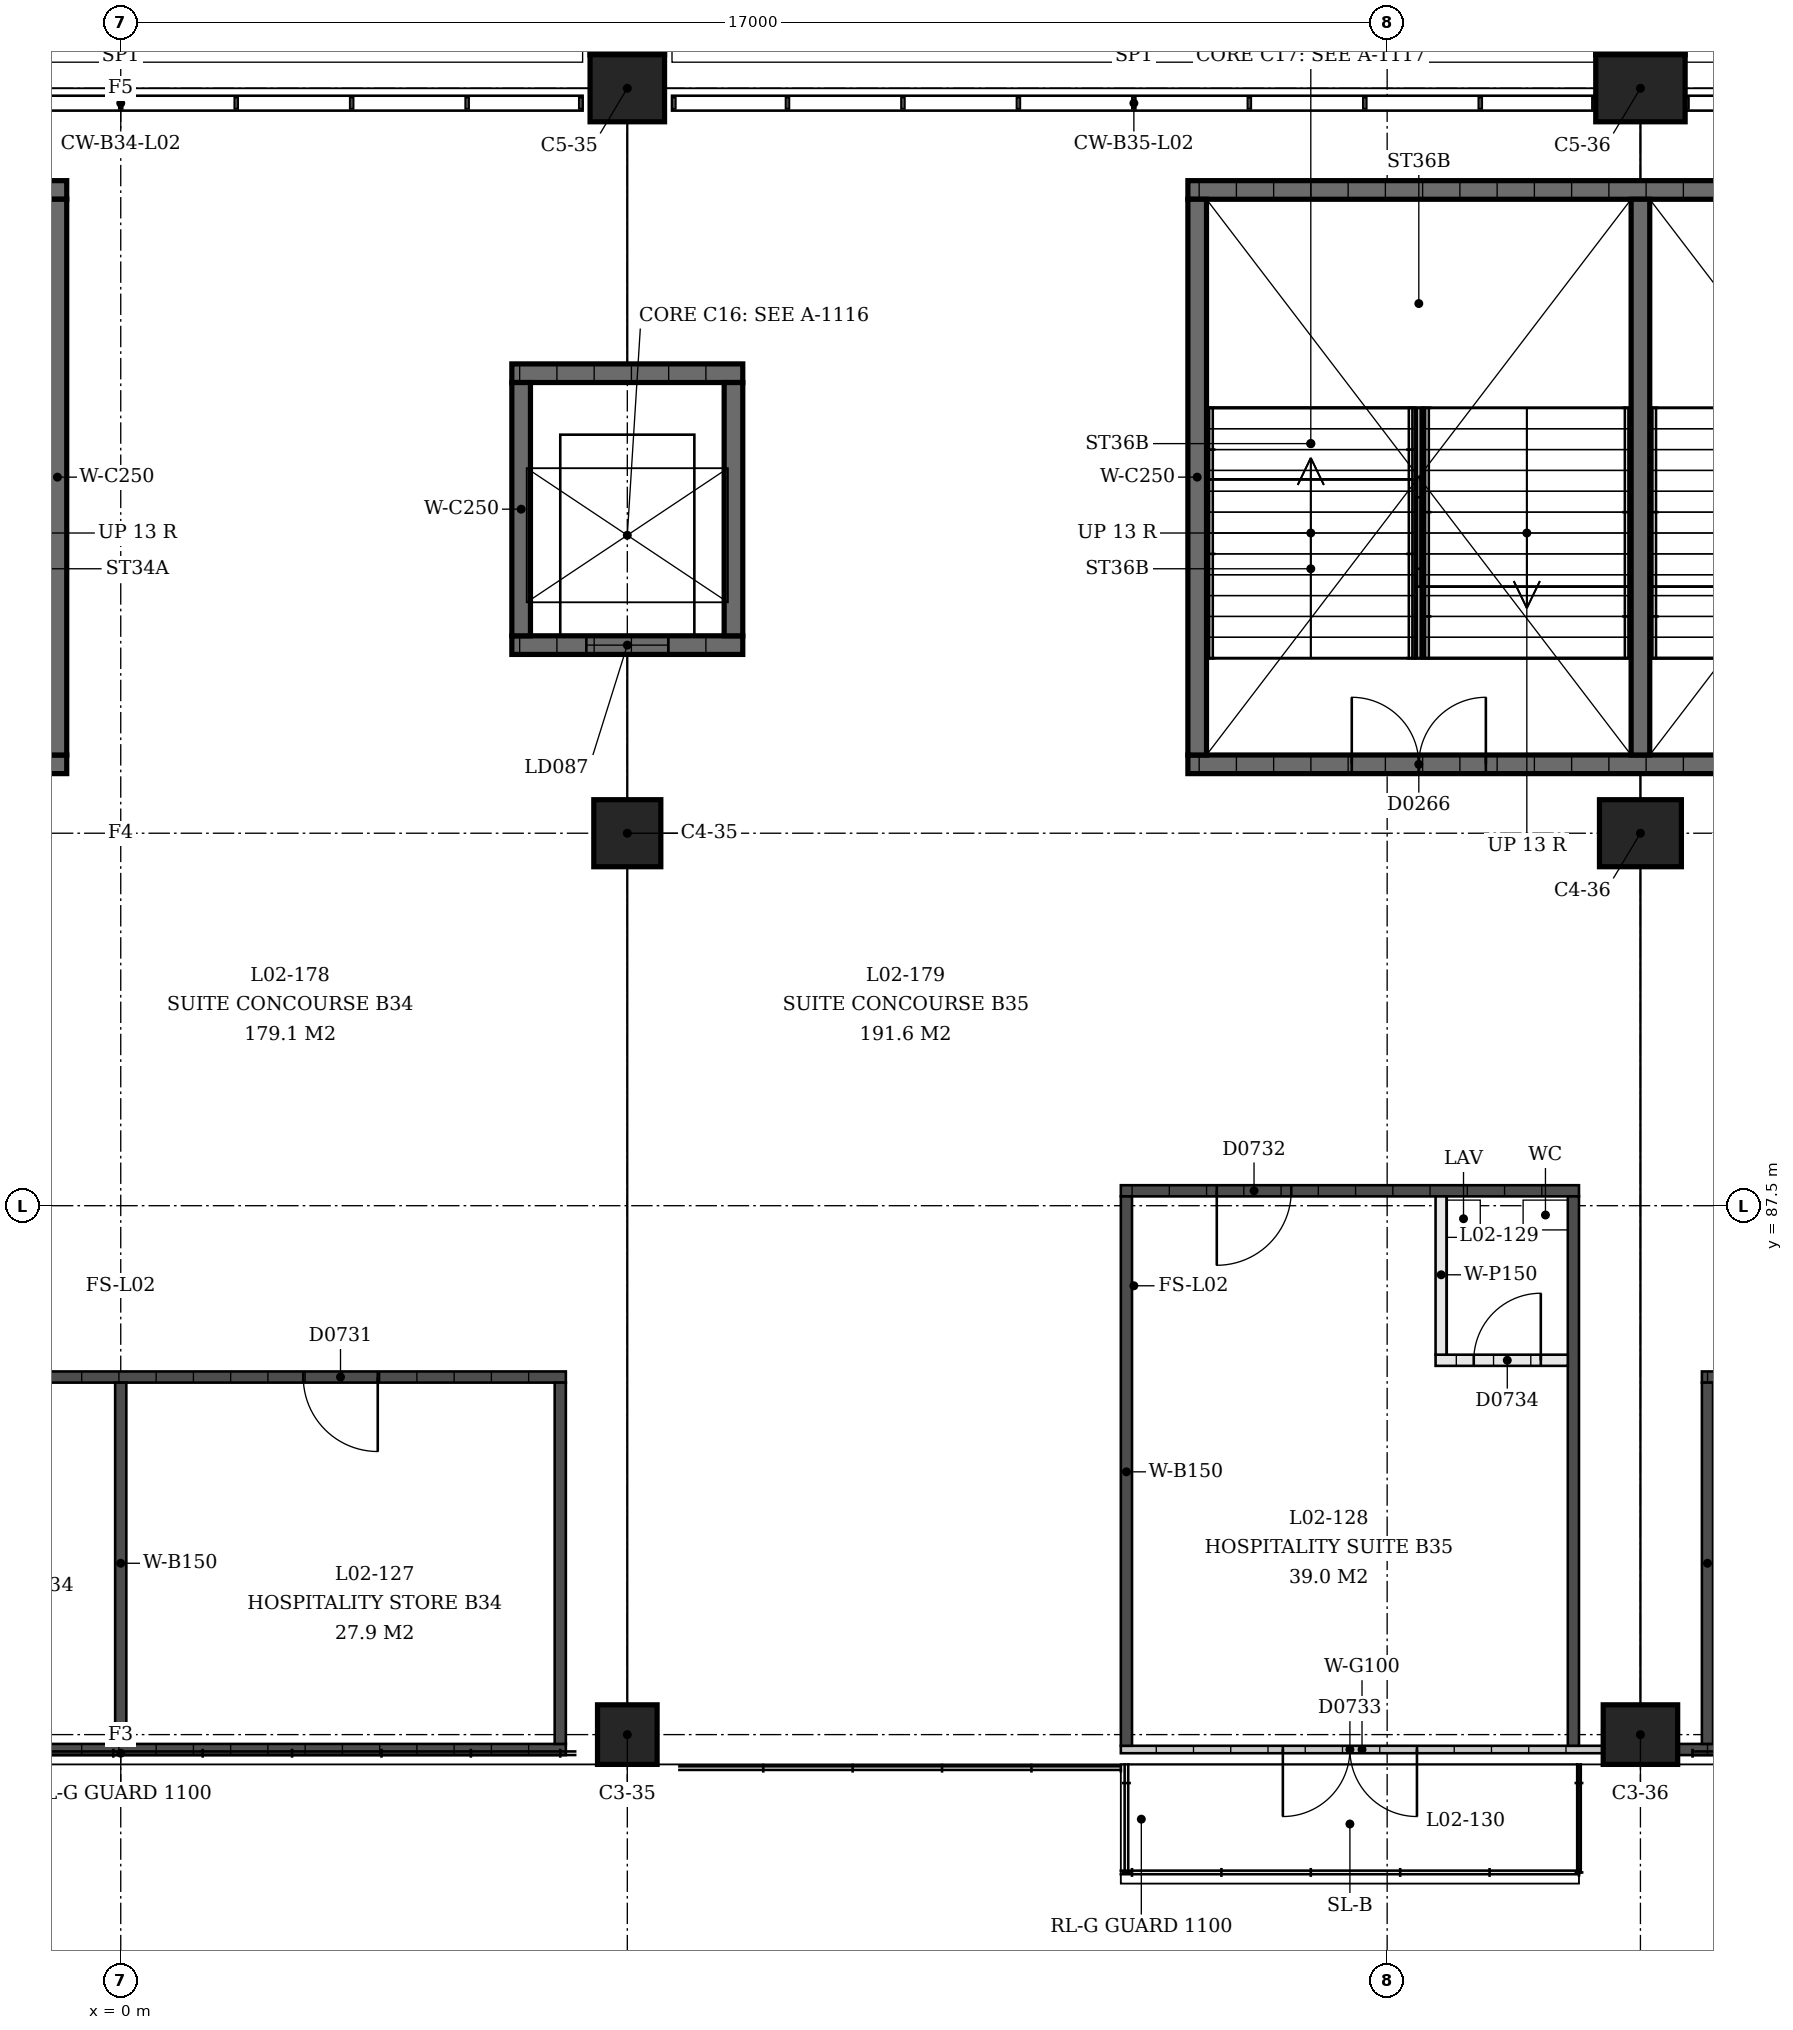
"""IFC4 building model, lengths in metres.
Left out: names, types, materials, properties, quantities, classifications, styles, units other than length and angle.
Written with IfcOpenShell. Run it as: python <this file> out.ifc"""

import sys

from ifc_helpers import new_model, si_unit, direction, frame, frame_2d, origin, origin_2d, place, context, subcontext, project, spatial, rectangle, extrude, element, fill, save


model = new_model("IFC4")
c1 = context("Model", 3, precision=1e-05, world=origin(), true_north=direction((0.0, 1.0)))
c2 = subcontext(c1, "Body", "Model", "MODEL_VIEW")
j1 = project(units=[si_unit("LENGTHUNIT", "METRE"), si_unit("PLANEANGLEUNIT", "RADIAN")], contexts=[c1])
p1 = place(None, origin())
s1 = spatial("IfcSite", under=j1, at=p1, CompositionType="ELEMENT")
p2 = place(p1, origin())
s2 = spatial("IfcBuilding", under=s1, at=p2, CompositionType="ELEMENT")
p3 = place(p2, frame((0.0, 0.0, 9.0)))
s3 = spatial("IfcBuildingStorey", under=s2, at=p3, CompositionType="ELEMENT", Elevation=9.0)
p4 = place(p3, frame((6.8, 80.4, 0.0), z_axis=(0.0, 0.0, 1.0), x_axis=(-1.0, 0.0, 0.0)))
e1 = element("IfcColumn", 1, at=p4, inside=s3, PredefinedType="COLUMN", context=c2, shape_type="SweptSolid", body=[
    extrude(rectangle(XDim=0.8, YDim=0.8, at=origin_2d()), origin(), (0.0, 0.0, 1.0), 4.5),
])
p5 = place(p3, frame((6.8, 92.5, 0.0), z_axis=(0.0, 0.0, 1.0), x_axis=(-1.0, 0.0, 0.0)))
e2 = element("IfcColumn", 2, at=p5, inside=s3, PredefinedType="COLUMN", context=c2, shape_type="SweptSolid", body=[
    extrude(rectangle(XDim=0.9, YDim=0.9, at=origin_2d()), origin(), (0.0, 0.0, 1.0), 4.5),
])
p6 = place(p3, frame((6.8, 102.5, 0.0), z_axis=(0.0, 0.0, 1.0), x_axis=(-1.0, 0.0, 0.0)))
e3 = element("IfcColumn", 3, at=p6, inside=s3, PredefinedType="COLUMN", context=c2, shape_type="SweptSolid", body=[
    extrude(rectangle(XDim=1.0, YDim=0.9, at=origin_2d()), origin(), (0.0, 0.0, 1.0), 4.5),
])
p7 = place(p3, frame((20.4, 80.4, 0.0), z_axis=(0.0, 0.0, 1.0), x_axis=(-1.0, 0.0, 0.0)))
e4 = element("IfcColumn", 4, at=p7, inside=s3, PredefinedType="COLUMN", context=c2, shape_type="SweptSolid", body=[
    extrude(rectangle(XDim=1.0, YDim=0.8, at=origin_2d()), origin(), (0.0, 0.0, 1.0), 4.5),
])
p8 = place(p3, frame((20.4, 92.5, 0.0), z_axis=(0.0, 0.0, 1.0), x_axis=(-1.0, 0.0, 0.0)))
e5 = element("IfcColumn", 5, at=p8, inside=s3, PredefinedType="COLUMN", context=c2, shape_type="SweptSolid", body=[
    extrude(rectangle(XDim=1.1, YDim=0.9, at=origin_2d()), origin(), (0.0, 0.0, 1.0), 4.5),
])
p9 = place(p3, frame((20.4, 102.5, 0.0), z_axis=(0.0, 0.0, 1.0), x_axis=(-1.0, 0.0, 0.0)))
e6 = element("IfcColumn", 6, at=p9, inside=s3, PredefinedType="COLUMN", context=c2, shape_type="SweptSolid", body=[
    extrude(rectangle(XDim=1.2, YDim=0.9, at=origin_2d()), origin(), (0.0, 0.0, 1.0), 4.5),
])
p10 = place(p3, frame((-0.725, 93.425, 0.0), z_axis=(0.0, 0.0, 1.0), x_axis=(-1.0, 0.0, 0.0)))
e7 = element("IfcWall", 7, at=p10, inside=s3, PredefinedType="SHEAR", context=c2, shape_type="SweptSolid", body=[
    extrude(rectangle(XDim=12.15, YDim=0.25, at=frame_2d((6.075, 0.0))), origin(), (0.0, 0.0, 1.0), 4.09),
])
p11 = place(p10, frame((2.2, 0.0, 0.0)))
e8 = element("IfcOpeningElement", 8, at=p11, cuts=e7, PredefinedType="OPENING", context=c2, shape_type="SweptSolid", body=[
    extrude(rectangle(XDim=1.8, YDim=2.1, at=frame_2d((0.9, 1.05))), frame((0.0, 0.125, 0.0), z_axis=(0.0, -1.0, 0.0), x_axis=(1.0, 0.0, 0.0)), (0.0, 0.0, 1.0), 0.25),
])
p12 = place(p10, frame((8.15, 0.0, 0.0)))
e9 = element("IfcOpeningElement", 9, at=p12, cuts=e7, PredefinedType="OPENING", context=c2, shape_type="SweptSolid", body=[
    extrude(rectangle(XDim=1.8, YDim=2.1, at=frame_2d((0.9, 1.05))), frame((0.0, 0.125, 0.0), z_axis=(0.0, -1.0, 0.0), x_axis=(1.0, 0.0, 0.0)), (0.0, 0.0, 1.0), 0.25),
])
p13 = place(p3, frame((-0.725, 101.135, 0.0), z_axis=(0.0, 0.0, 1.0), x_axis=(-1.0, 0.0, 0.0)))
e10 = element("IfcWall", 10, at=p13, inside=s3, PredefinedType="SHEAR", context=c2, shape_type="SweptSolid", body=[
    extrude(rectangle(XDim=12.15, YDim=0.25, at=frame_2d((6.075, 0.0))), origin(), (0.0, 0.0, 1.0), 4.09),
])
p14 = place(p3, frame((-0.85, 93.55, 0.0), z_axis=(0.0, 0.0, 1.0), x_axis=(0.0, 1.0, 0.0)))
e11 = element("IfcWall", 11, at=p14, inside=s3, PredefinedType="SHEAR", context=c2, shape_type="SweptSolid", body=[
    extrude(rectangle(XDim=7.46, YDim=0.25, at=frame_2d((3.73, 0.0))), origin(), (0.0, 0.0, 1.0), 4.09),
])
p15 = place(p3, frame((26.475, 93.425, 0.0), z_axis=(0.0, 0.0, 1.0), x_axis=(-1.0, 0.0, 0.0)))
e12 = element("IfcWall", 12, at=p15, inside=s3, PredefinedType="SHEAR", context=c2, shape_type="SweptSolid", body=[
    extrude(rectangle(XDim=12.15, YDim=0.25, at=frame_2d((6.075, 0.0))), origin(), (0.0, 0.0, 1.0), 4.09),
])
p16 = place(p15, frame((2.2, 0.0, 0.0)))
e13 = element("IfcOpeningElement", 13, at=p16, cuts=e12, PredefinedType="OPENING", context=c2, shape_type="SweptSolid", body=[
    extrude(rectangle(XDim=1.8, YDim=2.1, at=frame_2d((0.9, 1.05))), frame((0.0, 0.125, 0.0), z_axis=(0.0, -1.0, 0.0), x_axis=(1.0, 0.0, 0.0)), (0.0, 0.0, 1.0), 0.25),
])
p17 = place(p15, frame((8.15, 0.0, 0.0)))
e14 = element("IfcOpeningElement", 14, at=p17, cuts=e12, PredefinedType="OPENING", context=c2, shape_type="SweptSolid", body=[
    extrude(rectangle(XDim=1.8, YDim=2.1, at=frame_2d((0.9, 1.05))), frame((0.0, 0.125, 0.0), z_axis=(0.0, -1.0, 0.0), x_axis=(1.0, 0.0, 0.0)), (0.0, 0.0, 1.0), 0.25),
])
p18 = place(p3, frame((26.475, 101.135, 0.0), z_axis=(0.0, 0.0, 1.0), x_axis=(-1.0, 0.0, 0.0)))
e15 = element("IfcWall", 15, at=p18, inside=s3, PredefinedType="SHEAR", context=c2, shape_type="SweptSolid", body=[
    extrude(rectangle(XDim=12.15, YDim=0.25, at=frame_2d((6.075, 0.0))), origin(), (0.0, 0.0, 1.0), 4.09),
])
for number, where, z_axis, x_axis in (
    (16, (14.45, 93.55, 0.0), (0.0, 0.0, 1.0), (0.0, 1.0, 0.0)),
    (17, (20.4, 93.55, 0.0), (0.0, 0.0, 1.0), (0.0, 1.0, 0.0)),
):
    element("IfcWall", number, at=place(p3, frame(where, z_axis=z_axis, x_axis=x_axis)), inside=s3, PredefinedType="SHEAR", context=c2, shape_type="SweptSolid", body=[
        extrude(rectangle(XDim=7.46, YDim=0.25, at=frame_2d((3.73, 0.0))), origin(), (0.0, 0.0, 1.0), 4.09),
    ])
p19 = place(p3, frame((8.35, 95.025, 0.0), z_axis=(0.0, 0.0, 1.0), x_axis=(-1.0, 0.0, 0.0)))
e18 = element("IfcWall", 18, at=p19, inside=s3, PredefinedType="SHEAR", context=c2, shape_type="SweptSolid", body=[
    extrude(rectangle(XDim=3.1, YDim=0.25, at=frame_2d((1.55, 0.0))), origin(), (0.0, 0.0, 1.0), 4.09),
])
p20 = place(p19, frame((1.0, 0.0, 0.0)))
e19 = element("IfcOpeningElement", 19, at=p20, cuts=e18, PredefinedType="OPENING", context=c2, shape_type="SweptSolid", body=[
    extrude(rectangle(XDim=1.1, YDim=2.1, at=frame_2d((0.55, 1.05))), frame((0.0, 0.125, 0.0), z_axis=(0.0, -1.0, 0.0), x_axis=(1.0, 0.0, 0.0)), (0.0, 0.0, 1.0), 0.25),
])
p21 = place(p3, frame((8.35, 98.675, 0.0), z_axis=(0.0, 0.0, 1.0), x_axis=(-1.0, 0.0, 0.0)))
e20 = element("IfcWall", 20, at=p21, inside=s3, PredefinedType="SHEAR", context=c2, shape_type="SweptSolid", body=[
    extrude(rectangle(XDim=3.1, YDim=0.25, at=frame_2d((1.55, 0.0))), origin(), (0.0, 0.0, 1.0), 4.09),
])
for number, where, z_axis, x_axis in (
    (21, (8.225, 95.15, 0.0), (0.0, 0.0, 1.0), (0.0, 1.0, 0.0)),
    (22, (5.375, 95.15, 0.0), (0.0, 0.0, 1.0), (0.0, 1.0, 0.0)),
):
    element("IfcWall", number, at=place(p3, frame(where, z_axis=z_axis, x_axis=x_axis)), inside=s3, PredefinedType="SHEAR", context=c2, shape_type="SweptSolid", body=[
        extrude(rectangle(XDim=3.4, YDim=0.25, at=frame_2d((1.7, 0.0))), origin(), (0.0, 0.0, 1.0), 4.09),
    ])
p22 = place(p3, frame((-6.3, 80.2, 0.0), z_axis=(0.0, 0.0, 1.0), x_axis=(1.0, 0.0, 0.0)))
e23 = element("IfcWall", 23, at=p22, inside=s3, PredefinedType="SOLIDWALL", context=c2, shape_type="SweptSolid", body=[
    extrude(rectangle(XDim=12.275, YDim=0.15, at=frame_2d((6.138, 0.0))), origin(), (0.0, 0.0, 1.0), 3.0),
])
p23 = place(p3, frame((-5.975, 85.2, 0.0), z_axis=(0.0, 0.0, 1.0), x_axis=(1.0, 0.0, 0.0)))
e24 = element("IfcWall", 24, at=p23, inside=s3, PredefinedType="SOLIDWALL", context=c2, shape_type="SweptSolid", body=[
    extrude(rectangle(XDim=11.95, YDim=0.15, at=frame_2d((5.975, 0.0))), origin(), (0.0, 0.0, 1.0), 3.0),
])
p24 = place(p23, frame((2.525, 0.0, 0.0)))
e25 = element("IfcOpeningElement", 25, at=p24, cuts=e24, PredefinedType="OPENING", context=c2, shape_type="SweptSolid", body=[
    extrude(rectangle(XDim=1.0, YDim=2.1, at=frame_2d((0.5, 1.05))), frame((0.0, 0.075, 0.0), z_axis=(0.0, -1.0, 0.0), x_axis=(1.0, 0.0, 0.0)), (0.0, 0.0, 1.0), 0.15),
])
p25 = place(p23, frame((8.425, 0.0, 0.0)))
e26 = element("IfcOpeningElement", 26, at=p25, cuts=e24, PredefinedType="OPENING", context=c2, shape_type="SweptSolid", body=[
    extrude(rectangle(XDim=1.0, YDim=2.1, at=frame_2d((0.5, 1.05))), frame((0.0, 0.075, 0.0), z_axis=(0.0, -1.0, 0.0), x_axis=(1.0, 0.0, 0.0)), (0.0, 0.0, 1.0), 0.15),
])
for number, where, z_axis, x_axis in (
    (27, (0.0, 80.275, 0.0), (0.0, 0.0, 1.0), (0.0, 1.0, 0.0)),
    (28, (5.9, 80.275, 0.0), (0.0, 0.0, 1.0), (0.0, 1.0, 0.0)),
):
    element("IfcWall", number, at=place(p3, frame(where, z_axis=z_axis, x_axis=x_axis)), inside=s3, PredefinedType="SOLIDWALL", context=c2, shape_type="SweptSolid", body=[
        extrude(rectangle(XDim=4.85, YDim=0.15, at=frame_2d((2.425, 0.0))), origin(), (0.0, 0.0, 1.0), 3.0),
    ])
p26 = place(p3, frame((19.9, 80.2, 0.0), z_axis=(0.0, 0.0, 1.0), x_axis=(-1.0, 0.0, 0.0)))
e29 = element("IfcWall", 29, at=p26, inside=s3, PredefinedType="PARTITIONING", context=c2, shape_type="SweptSolid", body=[
    extrude(rectangle(XDim=6.475, YDim=0.1, at=frame_2d((3.237, 0.0))), origin(), (0.0, 0.0, 1.0), 3.0),
])
p27 = place(p26, frame((2.5, 0.0, 0.0)))
e30 = element("IfcOpeningElement", 30, at=p27, cuts=e29, PredefinedType="OPENING", context=c2, shape_type="SweptSolid", body=[
    extrude(rectangle(XDim=1.8, YDim=2.1, at=frame_2d((0.9, 1.05))), frame((0.0, 0.05, 0.0), z_axis=(0.0, -1.0, 0.0), x_axis=(1.0, 0.0, 0.0)), (0.0, 0.0, 1.0), 0.1),
])
p28 = place(p3, frame((19.575, 87.7, 0.0), z_axis=(0.0, 0.0, 1.0), x_axis=(-1.0, 0.0, 0.0)))
e31 = element("IfcWall", 31, at=p28, inside=s3, PredefinedType="SOLIDWALL", context=c2, shape_type="SweptSolid", body=[
    extrude(rectangle(XDim=6.15, YDim=0.15, at=frame_2d((3.075, 0.0))), origin(), (0.0, 0.0, 1.0), 3.0),
])
p29 = place(p28, frame((3.862, 0.0, 0.0)))
e32 = element("IfcOpeningElement", 32, at=p29, cuts=e31, PredefinedType="OPENING", context=c2, shape_type="SweptSolid", body=[
    extrude(rectangle(XDim=1.0, YDim=2.1, at=frame_2d((0.5, 1.05))), frame((0.0, 0.075, 0.0), z_axis=(0.0, -1.0, 0.0), x_axis=(1.0, 0.0, 0.0)), (0.0, 0.0, 1.0), 0.15),
])
for number, where, z_axis, x_axis in (
    (33, (19.5, 80.25, 0.0), (0.0, 0.0, 1.0), (0.0, 1.0, 0.0)),
    (34, (13.5, 80.25, 0.0), (0.0, 0.0, 1.0), (0.0, 1.0, 0.0)),
):
    element("IfcWall", number, at=place(p3, frame(where, z_axis=z_axis, x_axis=x_axis)), inside=s3, PredefinedType="SOLIDWALL", context=c2, shape_type="SweptSolid", body=[
        extrude(rectangle(XDim=7.375, YDim=0.15, at=frame_2d((3.688, 0.0))), origin(), (0.0, 0.0, 1.0), 3.0),
    ])
p30 = place(p3, frame((19.425, 85.425, 0.0), z_axis=(0.0, 0.0, 1.0), x_axis=(-1.0, 0.0, 0.0)))
e35 = element("IfcWall", 35, at=p30, inside=s3, PredefinedType="PARTITIONING", context=c2, shape_type="SweptSolid", body=[
    extrude(rectangle(XDim=1.775, YDim=0.15, at=frame_2d((0.888, 0.0))), origin(), (0.0, 0.0, 1.0), 3.0),
])
p31 = place(p30, frame((0.363, 0.0, 0.0)))
e36 = element("IfcOpeningElement", 36, at=p31, cuts=e35, PredefinedType="OPENING", context=c2, shape_type="SweptSolid", body=[
    extrude(rectangle(XDim=0.9, YDim=2.1, at=frame_2d((0.45, 1.05))), frame((0.0, 0.075, 0.0), z_axis=(0.0, -1.0, 0.0), x_axis=(1.0, 0.0, 0.0)), (0.0, 0.0, 1.0), 0.15),
])
p32 = place(p3, frame((17.725, 85.5, 0.0), z_axis=(0.0, 0.0, 1.0), x_axis=(0.0, 1.0, 0.0)))
e37 = element("IfcWall", 37, at=p32, inside=s3, PredefinedType="PARTITIONING", context=c2, shape_type="SweptSolid", body=[
    extrude(rectangle(XDim=2.125, YDim=0.15, at=frame_2d((1.062, 0.0))), origin(), (0.0, 0.0, 1.0), 3.0),
])
p33 = place(p3, frame((20.9, 80.2, 0.0), z_axis=(0.0, 0.0, 1.0), x_axis=(1.0, 0.0, 0.0)))
e38 = element("IfcWall", 38, at=p33, inside=s3, PredefinedType="SOLIDWALL", context=c2, shape_type="SweptSolid", body=[
    extrude(rectangle(XDim=12.275, YDim=0.15, at=frame_2d((6.138, 0.0))), origin(), (0.0, 0.0, 1.0), 3.0),
])
p34 = place(p3, frame((21.225, 85.2, 0.0), z_axis=(0.0, 0.0, 1.0), x_axis=(1.0, 0.0, 0.0)))
e39 = element("IfcWall", 39, at=p34, inside=s3, PredefinedType="SOLIDWALL", context=c2, shape_type="SweptSolid", body=[
    extrude(rectangle(XDim=11.95, YDim=0.15, at=frame_2d((5.975, 0.0))), origin(), (0.0, 0.0, 1.0), 3.0),
])
p35 = place(p34, frame((2.525, 0.0, 0.0)))
e40 = element("IfcOpeningElement", 40, at=p35, cuts=e39, PredefinedType="OPENING", context=c2, shape_type="SweptSolid", body=[
    extrude(rectangle(XDim=1.0, YDim=2.1, at=frame_2d((0.5, 1.05))), frame((0.0, 0.075, 0.0), z_axis=(0.0, -1.0, 0.0), x_axis=(1.0, 0.0, 0.0)), (0.0, 0.0, 1.0), 0.15),
])
p36 = place(p34, frame((8.425, 0.0, 0.0)))
e41 = element("IfcOpeningElement", 41, at=p36, cuts=e39, PredefinedType="OPENING", context=c2, shape_type="SweptSolid", body=[
    extrude(rectangle(XDim=1.0, YDim=2.1, at=frame_2d((0.5, 1.05))), frame((0.0, 0.075, 0.0), z_axis=(0.0, -1.0, 0.0), x_axis=(1.0, 0.0, 0.0)), (0.0, 0.0, 1.0), 0.15),
])
p37 = place(p3, frame((21.3, 80.275, 0.0), z_axis=(0.0, 0.0, 1.0), x_axis=(0.0, 1.0, 0.0)))
e42 = element("IfcWall", 42, at=p37, inside=s3, PredefinedType="SOLIDWALL", context=c2, shape_type="SweptSolid", body=[
    extrude(rectangle(XDim=4.85, YDim=0.15, at=frame_2d((2.425, 0.0))), origin(), (0.0, 0.0, 1.0), 3.0),
])
p38 = place(p17, origin())
e43 = element("IfcDoor", 43, at=p38, inside=s3, OperationType="DOUBLE_DOOR_SINGLE_SWING", PredefinedType="DOOR", context=c2, shape_type="SweptSolid", body=[
    extrude(rectangle(XDim=1.8, YDim=2.1, at=frame_2d((0.9, 1.05))), frame((0.0, 0.025, 0.0), z_axis=(0.0, -1.0, 0.0), x_axis=(1.0, 0.0, 0.0)), (0.0, 0.0, 1.0), 0.05),
])
fill(e14, e43)
p39 = place(p20, origin())
e44 = element("IfcDoor", 44, at=p39, inside=s3, OperationType="SLIDING_TO_LEFT", PredefinedType="DOOR", context=c2, shape_type="SweptSolid", body=[
    extrude(rectangle(XDim=1.1, YDim=2.1, at=frame_2d((0.55, 1.05))), frame((0.0, 0.025, 0.0), z_axis=(0.0, -1.0, 0.0), x_axis=(1.0, 0.0, 0.0)), (0.0, 0.0, 1.0), 0.05),
])
fill(e19, e44)
p40 = place(p25, origin())
e45 = element("IfcDoor", 45, at=p40, inside=s3, OperationType="SINGLE_SWING_RIGHT", PredefinedType="DOOR", context=c2, shape_type="SweptSolid", body=[
    extrude(rectangle(XDim=1.0, YDim=2.1, at=frame_2d((0.5, 1.05))), frame((0.0, 0.025, 0.0), z_axis=(0.0, -1.0, 0.0), x_axis=(1.0, 0.0, 0.0)), (0.0, 0.0, 1.0), 0.05),
])
fill(e26, e45)
p41 = place(p29, origin())
e46 = element("IfcDoor", 46, at=p41, inside=s3, OperationType="SINGLE_SWING_LEFT", PredefinedType="DOOR", context=c2, shape_type="SweptSolid", body=[
    extrude(rectangle(XDim=1.0, YDim=2.1, at=frame_2d((0.5, 1.05))), frame((0.0, 0.025, 0.0), z_axis=(0.0, -1.0, 0.0), x_axis=(1.0, 0.0, 0.0)), (0.0, 0.0, 1.0), 0.05),
])
fill(e32, e46)
p42 = place(p27, origin())
e47 = element("IfcDoor", 47, at=p42, inside=s3, OperationType="DOUBLE_DOOR_SINGLE_SWING", PredefinedType="DOOR", context=c2, shape_type="SweptSolid", body=[
    extrude(rectangle(XDim=1.8, YDim=2.1, at=frame_2d((0.9, 1.05))), frame((0.0, 0.025, 0.0), z_axis=(0.0, -1.0, 0.0), x_axis=(1.0, 0.0, 0.0)), (0.0, 0.0, 1.0), 0.05),
])
fill(e30, e47)
p43 = place(p31, origin())
e48 = element("IfcDoor", 48, at=p43, inside=s3, OperationType="SINGLE_SWING_LEFT", PredefinedType="DOOR", context=c2, shape_type="SweptSolid", body=[
    extrude(rectangle(XDim=0.9, YDim=2.1, at=frame_2d((0.45, 1.05))), frame((0.0, 0.025, 0.0), z_axis=(0.0, -1.0, 0.0), x_axis=(1.0, 0.0, 0.0)), (0.0, 0.0, 1.0), 0.05),
])
fill(e36, e48)
save(model, sys.argv[1])
